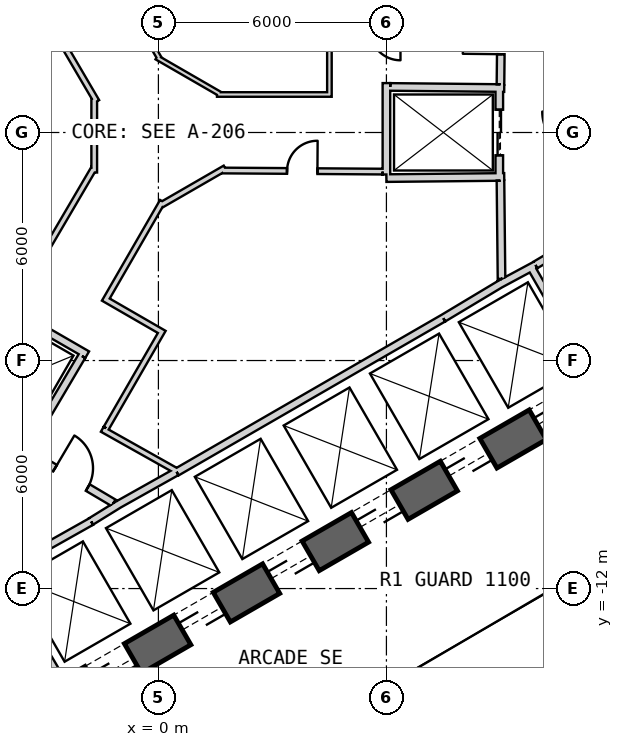
"""IFC4 building model, lengths in metres.
Left out: names, types, materials, properties, quantities, classifications, styles, units other than length and angle.
Written with IfcOpenShell. Run it as: python <this file> out.ifc"""

import sys

from ifc_helpers import new_model, si_unit, direction, frame, frame_2d, origin, place, context, subcontext, project, spatial, rectangle, extrude, element, fill, save


model = new_model("IFC4")
c1 = context("Model", 3, precision=1e-05, world=origin(), true_north=direction((0.0, 1.0)))
c2 = subcontext(c1, "Body", "Model", "MODEL_VIEW")
j1 = project(units=[si_unit("LENGTHUNIT", "METRE"), si_unit("PLANEANGLEUNIT", "RADIAN")], contexts=[c1])
p1 = place(None, origin())
s1 = spatial("IfcSite", under=j1, at=p1, CompositionType="ELEMENT")
p2 = place(p1, origin())
s2 = spatial("IfcBuilding", under=s1, at=p2, CompositionType="ELEMENT")
p3 = place(p2, frame((0.0, 0.0, 21.5)))
s3 = spatial("IfcBuildingStorey", under=s2, at=p3, CompositionType="ELEMENT", Elevation=21.5)
p4 = place(p3, frame((19.475, 2.208, 0.0), z_axis=(0.0, 0.0, 1.0), x_axis=(-0.866028369851, 0.499994862586, 0.0)))
e1 = element("IfcWall", 1, at=p4, inside=s3, PredefinedType="SHEAR", context=c2, shape_type="SweptSolid", body=[
    extrude(rectangle(XDim=31.523, YDim=0.9, at=frame_2d((15.762, 0.0))), origin(), (0.0, 0.0, 1.0), 6.0),
])
p5 = place(p4, frame((7.062, 0.0, 0.0)))
e2 = element("IfcOpeningElement", 2, at=p5, cuts=e1, PredefinedType="OPENING", context=c2, shape_type="SweptSolid", body=[
    extrude(rectangle(XDim=1.2, YDim=2.4, at=frame_2d((0.6, 1.2))), frame((0.0, 0.46, 0.0), z_axis=(0.0, -1.0, 0.0), x_axis=(1.0, 0.0, 0.0)), (0.0, 0.0, 1.0), 0.92),
])
p6 = place(p4, frame((9.762, 0.0, 0.0)))
e3 = element("IfcOpeningElement", 3, at=p6, cuts=e1, PredefinedType="OPENING", context=c2, shape_type="SweptSolid", body=[
    extrude(rectangle(XDim=1.2, YDim=2.4, at=frame_2d((0.6, 1.2))), frame((0.0, 0.46, 0.0), z_axis=(0.0, -1.0, 0.0), x_axis=(1.0, 0.0, 0.0)), (0.0, 0.0, 1.0), 0.92),
])
p7 = place(p4, frame((12.462, 0.0, 0.0)))
e4 = element("IfcOpeningElement", 4, at=p7, cuts=e1, PredefinedType="OPENING", context=c2, shape_type="SweptSolid", body=[
    extrude(rectangle(XDim=1.2, YDim=2.4, at=frame_2d((0.6, 1.2))), frame((0.0, 0.46, 0.0), z_axis=(0.0, -1.0, 0.0), x_axis=(1.0, 0.0, 0.0)), (0.0, 0.0, 1.0), 0.92),
])
p8 = place(p4, frame((15.162, 0.0, 0.0)))
e5 = element("IfcOpeningElement", 5, at=p8, cuts=e1, PredefinedType="OPENING", context=c2, shape_type="SweptSolid", body=[
    extrude(rectangle(XDim=1.2, YDim=2.4, at=frame_2d((0.6, 1.2))), frame((0.0, 0.46, 0.0), z_axis=(0.0, -1.0, 0.0), x_axis=(1.0, 0.0, 0.0)), (0.0, 0.0, 1.0), 0.92),
])
p9 = place(p4, frame((17.862, 0.0, 0.0)))
e6 = element("IfcOpeningElement", 6, at=p9, cuts=e1, PredefinedType="OPENING", context=c2, shape_type="SweptSolid", body=[
    extrude(rectangle(XDim=1.2, YDim=2.4, at=frame_2d((0.6, 1.2))), frame((0.0, 0.46, 0.0), z_axis=(0.0, -1.0, 0.0), x_axis=(1.0, 0.0, 0.0)), (0.0, 0.0, 1.0), 0.92),
])
p10 = place(p4, frame((20.562, 0.0, 0.0)))
e7 = element("IfcOpeningElement", 7, at=p10, cuts=e1, PredefinedType="OPENING", context=c2, shape_type="SweptSolid", body=[
    extrude(rectangle(XDim=1.2, YDim=2.4, at=frame_2d((0.6, 1.2))), frame((0.0, 0.46, 0.0), z_axis=(0.0, -1.0, 0.0), x_axis=(1.0, 0.0, 0.0)), (0.0, 0.0, 1.0), 0.92),
])
p11 = place(p4, frame((23.262, 0.0, 0.0)))
e8 = element("IfcOpeningElement", 8, at=p11, cuts=e1, PredefinedType="OPENING", context=c2, shape_type="SweptSolid", body=[
    extrude(rectangle(XDim=1.2, YDim=2.4, at=frame_2d((0.6, 1.2))), frame((0.0, 0.46, 0.0), z_axis=(0.0, -1.0, 0.0), x_axis=(1.0, 0.0, 0.0)), (0.0, 0.0, 1.0), 0.92),
])
p12 = place(p4, frame((3.612, 0.0, 0.0)))
e9 = element("IfcOpeningElement", 9, at=p12, cuts=e1, PredefinedType="OPENING", context=c2, shape_type="SweptSolid", body=[
    extrude(rectangle(XDim=1.2, YDim=2.4, at=frame_2d((0.6, 1.2))), frame((0.0, 0.46, 0.0), z_axis=(0.0, -1.0, 0.0), x_axis=(1.0, 0.0, 0.0)), (0.0, 0.0, 1.0), 0.92),
])
p13 = place(p4, frame((26.712, 0.0, 0.0)))
e10 = element("IfcOpeningElement", 10, at=p13, cuts=e1, PredefinedType="OPENING", context=c2, shape_type="SweptSolid", body=[
    extrude(rectangle(XDim=1.2, YDim=2.4, at=frame_2d((0.6, 1.2))), frame((0.0, 0.46, 0.0), z_axis=(0.0, -1.0, 0.0), x_axis=(1.0, 0.0, 0.0)), (0.0, 0.0, 1.0), 0.92),
])
p14 = place(p3, frame((-7.825, -17.97, 0.0), z_axis=(0.0, 0.0, 1.0), x_axis=(0.866028369851, 0.499994862586, 0.0)))
e11 = element("IfcWall", 11, at=p14, inside=s3, PredefinedType="SHEAR", context=c2, shape_type="SweptSolid", body=[
    extrude(rectangle(XDim=31.523, YDim=0.9, at=frame_2d((15.762, 0.0))), origin(), (0.0, 0.0, 1.0), 6.0),
])
p15 = place(p14, frame((7.062, 0.0, 0.0)))
e12 = element("IfcOpeningElement", 12, at=p15, cuts=e11, PredefinedType="OPENING", context=c2, shape_type="SweptSolid", body=[
    extrude(rectangle(XDim=1.2, YDim=2.4, at=frame_2d((0.6, 1.2))), frame((0.0, 0.46, 0.0), z_axis=(0.0, -1.0, 0.0), x_axis=(1.0, 0.0, 0.0)), (0.0, 0.0, 1.0), 0.92),
])
p16 = place(p14, frame((9.762, 0.0, 0.0)))
e13 = element("IfcOpeningElement", 13, at=p16, cuts=e11, PredefinedType="OPENING", context=c2, shape_type="SweptSolid", body=[
    extrude(rectangle(XDim=1.2, YDim=2.4, at=frame_2d((0.6, 1.2))), frame((0.0, 0.46, 0.0), z_axis=(0.0, -1.0, 0.0), x_axis=(1.0, 0.0, 0.0)), (0.0, 0.0, 1.0), 0.92),
])
p17 = place(p14, frame((12.462, 0.0, 0.0)))
e14 = element("IfcOpeningElement", 14, at=p17, cuts=e11, PredefinedType="OPENING", context=c2, shape_type="SweptSolid", body=[
    extrude(rectangle(XDim=1.2, YDim=2.4, at=frame_2d((0.6, 1.2))), frame((0.0, 0.46, 0.0), z_axis=(0.0, -1.0, 0.0), x_axis=(1.0, 0.0, 0.0)), (0.0, 0.0, 1.0), 0.92),
])
p18 = place(p14, frame((15.162, 0.0, 0.0)))
e15 = element("IfcOpeningElement", 15, at=p18, cuts=e11, PredefinedType="OPENING", context=c2, shape_type="SweptSolid", body=[
    extrude(rectangle(XDim=1.2, YDim=2.4, at=frame_2d((0.6, 1.2))), frame((0.0, 0.46, 0.0), z_axis=(0.0, -1.0, 0.0), x_axis=(1.0, 0.0, 0.0)), (0.0, 0.0, 1.0), 0.92),
])
p19 = place(p14, frame((17.862, 0.0, 0.0)))
e16 = element("IfcOpeningElement", 16, at=p19, cuts=e11, PredefinedType="OPENING", context=c2, shape_type="SweptSolid", body=[
    extrude(rectangle(XDim=1.2, YDim=2.4, at=frame_2d((0.6, 1.2))), frame((0.0, 0.46, 0.0), z_axis=(0.0, -1.0, 0.0), x_axis=(1.0, 0.0, 0.0)), (0.0, 0.0, 1.0), 0.92),
])
p20 = place(p14, frame((20.562, 0.0, 0.0)))
e17 = element("IfcOpeningElement", 17, at=p20, cuts=e11, PredefinedType="OPENING", context=c2, shape_type="SweptSolid", body=[
    extrude(rectangle(XDim=1.2, YDim=2.4, at=frame_2d((0.6, 1.2))), frame((0.0, 0.46, 0.0), z_axis=(0.0, -1.0, 0.0), x_axis=(1.0, 0.0, 0.0)), (0.0, 0.0, 1.0), 0.92),
])
p21 = place(p14, frame((26.712, 0.0, 0.0)))
e18 = element("IfcOpeningElement", 18, at=p21, cuts=e11, PredefinedType="OPENING", context=c2, shape_type="SweptSolid", body=[
    extrude(rectangle(XDim=1.2, YDim=2.4, at=frame_2d((0.6, 1.2))), frame((0.0, 0.46, 0.0), z_axis=(0.0, -1.0, 0.0), x_axis=(1.0, 0.0, 0.0)), (0.0, 0.0, 1.0), 0.92),
])
p22 = place(p14, frame((3.612, 0.0, 0.0)))
e19 = element("IfcOpeningElement", 19, at=p22, cuts=e11, PredefinedType="OPENING", context=c2, shape_type="SweptSolid", body=[
    extrude(rectangle(XDim=1.2, YDim=2.4, at=frame_2d((0.6, 1.2))), frame((0.0, 0.46, 0.0), z_axis=(0.0, -1.0, 0.0), x_axis=(1.0, 0.0, 0.0)), (0.0, 0.0, 1.0), 0.92),
])
p23 = place(p3, frame((0.483, -8.936, 0.0), z_axis=(0.0, 0.0, 1.0), x_axis=(0.866030989016, 0.499990325971, 0.0)))
e20 = element("IfcWall", 20, at=p23, inside=s3, PredefinedType="PLUMBINGWALL", context=c2, shape_type="SweptSolid", body=[
    extrude(rectangle(XDim=8.1, YDim=0.2, at=frame_2d((4.05, 0.0))), origin(), (0.0, 0.0, 1.0), 5.7),
])
p24 = place(p3, frame((9.795, -3.525, 0.0), z_axis=(0.0, 0.0, 1.0), x_axis=(0.499984717929, -0.866034226713, 0.0)))
e21 = element("IfcWall", 21, at=p24, inside=s3, PredefinedType="PLUMBINGWALL", context=c2, shape_type="SweptSolid", body=[
    extrude(rectangle(XDim=3.25, YDim=0.2, at=frame_2d((1.625, 0.0))), origin(), (0.0, 0.0, 1.0), 5.7),
])
p25 = place(p3, frame((8.974, -3.999, 0.0), z_axis=(0.0, 0.0, 1.0), x_axis=(0.880907015104, 0.473289373154, 0.0)))
e22 = element("IfcWall", 22, at=p25, inside=s3, PredefinedType="PLUMBINGWALL", context=c2, shape_type="SweptSolid", body=[
    extrude(rectangle(XDim=1.078, YDim=0.2, at=frame_2d((0.539, 0.0))), origin(), (0.0, 0.0, 1.0), 5.7),
])
p26 = place(p3, frame((7.497, -4.886, 0.0), z_axis=(0.0, 0.0, 1.0), x_axis=(0.857516281273, 0.51445682749, 0.0)))
e23 = element("IfcWall", 23, at=p26, inside=s3, PredefinedType="PLUMBINGWALL", context=c2, shape_type="SweptSolid", body=[
    extrude(rectangle(XDim=1.845, YDim=0.2, at=frame_2d((0.922, 0.0))), origin(), (0.0, 0.0, 1.0), 5.7),
])
p27 = place(p3, frame((-2.558, -14.409, 0.0), z_axis=(0.0, 0.0, 1.0), x_axis=(-0.507997497166, 0.861358544901, 0.0)))
e24 = element("IfcWall", 24, at=p27, inside=s3, PredefinedType="PLUMBINGWALL", context=c2, shape_type="SweptSolid", body=[
    extrude(rectangle(XDim=3.35, YDim=0.2, at=frame_2d((1.675, 0.0))), origin(), (0.0, 0.0, 1.0), 5.7),
])
p28 = place(p3, frame((-1.769, -10.237, 0.0), z_axis=(0.0, 0.0, 1.0), x_axis=(-0.871534483978, -0.490334215854, 0.0)))
e25 = element("IfcWall", 25, at=p28, inside=s3, PredefinedType="PLUMBINGWALL", context=c2, shape_type="SweptSolid", body=[
    extrude(rectangle(XDim=2.7, YDim=0.2, at=frame_2d((1.35, 0.0))), origin(), (0.0, 0.0, 1.0), 5.7),
])
p29 = place(p3, frame((-1.024, -9.771, 0.0), z_axis=(0.0, 0.0, 1.0), x_axis=(-0.850348075135, -0.526220629693, 0.0)))
e26 = element("IfcWall", 26, at=p29, inside=s3, PredefinedType="PLUMBINGWALL", context=c2, shape_type="SweptSolid", body=[
    extrude(rectangle(XDim=0.878, YDim=0.2, at=frame_2d((0.439, 0.0))), origin(), (0.0, 0.0, 1.0), 5.7),
])
p30 = place(p3, frame((-1.13, -9.832, 0.0), z_axis=(0.0, 0.0, 1.0), x_axis=(0.871988740738, 0.489525929882, 0.0)))
e27 = element("IfcWall", 27, at=p30, inside=s3, PredefinedType="PLUMBINGWALL", context=c2, shape_type="SweptSolid", body=[
    extrude(rectangle(XDim=1.845, YDim=0.2, at=frame_2d((0.922, 0.0))), origin(), (0.0, 0.0, 1.0), 5.7),
])
p31 = place(p3, frame((8.97, 1.2, 0.0), z_axis=(0.0, 0.0, 1.0), x_axis=(0.0, -1.0, 0.0)))
e28 = element("IfcWall", 28, at=p31, inside=s3, PredefinedType="PLUMBINGWALL", context=c2, shape_type="SweptSolid", body=[
    extrude(rectangle(XDim=2.4, YDim=0.2, at=frame_2d((1.2, 0.0))), origin(), (0.0, 0.0, 1.0), 5.7),
])
p32 = place(p31, frame((0.6, 0.0, 0.0)))
e29 = element("IfcOpeningElement", 29, at=p32, cuts=e28, PredefinedType="OPENING", context=c2, shape_type="SweptSolid", body=[
    extrude(rectangle(XDim=1.2, YDim=2.4, at=frame_2d((0.6, 1.2))), frame((0.0, 0.11, 0.0), z_axis=(0.0, -1.0, 0.0), x_axis=(1.0, 0.0, 0.0)), (0.0, 0.0, 1.0), 0.22),
])
p33 = place(p3, frame((9.1, -1.169, 0.0), z_axis=(0.0, 0.0, 1.0), x_axis=(-0.999949988, -0.010001074852, 0.0)))
e30 = element("IfcWall", 30, at=p33, inside=s3, PredefinedType="PLUMBINGWALL", context=c2, shape_type="SweptSolid", body=[
    extrude(rectangle(XDim=3.1, YDim=0.2, at=frame_2d((1.55, 0.0))), origin(), (0.0, 0.0, 1.0), 5.7),
])
p34 = place(p3, frame((6.0, -1.104, 0.0), z_axis=(0.0, 0.0, 1.0), x_axis=(0.0, 1.0, 0.0)))
e31 = element("IfcWall", 31, at=p34, inside=s3, PredefinedType="PLUMBINGWALL", context=c2, shape_type="SweptSolid", body=[
    extrude(rectangle(XDim=2.405, YDim=0.2, at=frame_2d((1.202, 0.0))), origin(), (0.0, 0.0, 1.0), 5.7),
])
p35 = place(p3, frame((9.1, 1.169, 0.0), z_axis=(0.0, 0.0, 1.0), x_axis=(-0.99994990606, 0.010009264196, 0.0)))
e32 = element("IfcWall", 32, at=p35, inside=s3, PredefinedType="PLUMBINGWALL", context=c2, shape_type="SweptSolid", body=[
    extrude(rectangle(XDim=3.0, YDim=0.2, at=frame_2d((1.5, 0.0))), origin(), (0.0, 0.0, 1.0), 5.7),
])
p36 = place(p3, frame((-3.957, -4.644, 0.0), z_axis=(0.0, 0.0, 1.0), x_axis=(0.865991127953, -0.500059362782, 0.0)))
e33 = element("IfcWall", 33, at=p36, inside=s3, PredefinedType="PLUMBINGWALL", context=c2, shape_type="SweptSolid", body=[
    extrude(rectangle(XDim=2.405, YDim=0.2, at=frame_2d((1.202, 0.0))), origin(), (0.0, 0.0, 1.0), 5.7),
])
p37 = place(p3, frame((-2.012, -5.882, 0.0), z_axis=(0.0, 0.0, 1.0), x_axis=(-0.508619639323, -0.860991325447, 0.0)))
e34 = element("IfcWall", 34, at=p37, inside=s3, PredefinedType="PLUMBINGWALL", context=c2, shape_type="SweptSolid", body=[
    extrude(rectangle(XDim=3.0, YDim=0.2, at=frame_2d((1.5, 0.0))), origin(), (0.0, 0.0, 1.0), 5.7),
])
p38 = place(p3, frame((12.245, -2.109, 0.0), z_axis=(0.0, 0.0, 1.0), x_axis=(-0.860414880418, -0.509594185166, 0.0)))
e35 = element("IfcWall", 35, at=p38, inside=s3, PredefinedType="PARTITIONING", context=c2, shape_type="SweptSolid", body=[
    extrude(rectangle(XDim=2.7, YDim=0.2, at=frame_2d((1.35, 0.0))), origin(), (0.0, 0.0, 1.0), 5.7),
])
p39 = place(p3, frame((9.029, -3.851, 0.0), z_axis=(0.0, 0.0, 1.0), x_axis=(-0.010784614026, 0.999941844359, 0.0)))
e36 = element("IfcWall", 36, at=p39, inside=s3, PredefinedType="PARTITIONING", context=c2, shape_type="SweptSolid", body=[
    extrude(rectangle(XDim=2.581, YDim=0.2, at=frame_2d((1.291, 0.0))), origin(), (0.0, 0.0, 1.0), 5.7),
])
p40 = place(p3, frame((9.001, 1.27, 0.0), z_axis=(0.0, 0.0, 1.0), x_axis=(0.010783593937, 0.99994185536, 0.0)))
e37 = element("IfcWall", 37, at=p40, inside=s3, PredefinedType="PARTITIONING", context=c2, shape_type="SweptSolid", body=[
    extrude(rectangle(XDim=2.581, YDim=0.2, at=frame_2d((1.291, 0.0))), origin(), (0.0, 0.0, 1.0), 5.7),
])
p41 = place(p40, frame((0.791, 0.0, 0.0)))
e38 = element("IfcOpeningElement", 38, at=p41, cuts=e37, PredefinedType="OPENING", context=c2, shape_type="SweptSolid", body=[
    extrude(rectangle(XDim=1.0, YDim=2.1, at=frame_2d((0.5, 1.05))), frame((0.0, 0.11, 0.0), z_axis=(0.0, -1.0, 0.0), x_axis=(1.0, 0.0, 0.0)), (0.0, 0.0, 1.0), 0.22),
])
p42 = place(p3, frame((-3.401, -8.43, 0.0), z_axis=(0.0, 0.0, 1.0), x_axis=(0.860598681535, -0.509283721849, 0.0)))
e39 = element("IfcWall", 39, at=p42, inside=s3, PredefinedType="PARTITIONING", context=c2, shape_type="SweptSolid", body=[
    extrude(rectangle(XDim=2.581, YDim=0.2, at=frame_2d((1.291, 0.0))), origin(), (0.0, 0.0, 1.0), 5.7),
])
p43 = place(p42, frame((0.791, 0.0, 0.0)))
e40 = element("IfcOpeningElement", 40, at=p43, cuts=e39, PredefinedType="OPENING", context=c2, shape_type="SweptSolid", body=[
    extrude(rectangle(XDim=1.0, YDim=2.1, at=frame_2d((0.5, 1.05))), frame((0.0, 0.11, 0.0), z_axis=(0.0, -1.0, 0.0), x_axis=(1.0, 0.0, 0.0)), (0.0, 0.0, 1.0), 0.22),
])
p44 = place(p3, frame((-1.624, 0.815, 0.0), z_axis=(0.0, 0.0, 1.0), x_axis=(-0.505868173579, 0.862610799237, 0.0)))
e41 = element("IfcWall", 41, at=p44, inside=s3, PredefinedType="PLUMBINGWALL", context=c2, shape_type="SweptSolid", body=[
    extrude(rectangle(XDim=4.383, YDim=0.15, at=frame_2d((2.191, 0.0))), origin(), (0.0, 0.0, 1.0), 5.7),
])
p45 = place(p44, frame((1.855, 0.0, 0.0)))
e42 = element("IfcOpeningElement", 42, at=p45, cuts=e41, PredefinedType="OPENING", context=c2, shape_type="SweptSolid", body=[
    extrude(rectangle(XDim=0.8, YDim=2.1, at=frame_2d((0.4, 1.05))), frame((0.0, 0.085, 0.0), z_axis=(0.0, -1.0, 0.0), x_axis=(1.0, 0.0, 0.0)), (0.0, 0.0, 1.0), 0.17),
])
p46 = place(p3, frame((-1.689, -1.053, 0.0), z_axis=(0.0, 0.0, 1.0), x_axis=(0.0, 1.0, 0.0)))
e43 = element("IfcWall", 43, at=p46, inside=s3, PredefinedType="PLUMBINGWALL", context=c2, shape_type="SweptSolid", body=[
    extrude(rectangle(XDim=1.954, YDim=0.15, at=frame_2d((0.977, 0.0))), origin(), (0.0, 0.0, 1.0), 5.7),
])
p47 = place(p3, frame((-3.841, -4.595, 0.0), z_axis=(0.0, 0.0, 1.0), x_axis=(0.505857207696, 0.862617229959, 0.0)))
e44 = element("IfcWall", 44, at=p47, inside=s3, PredefinedType="PLUMBINGWALL", context=c2, shape_type="SweptSolid", body=[
    extrude(rectangle(XDim=4.231, YDim=0.15, at=frame_2d((2.116, 0.0))), origin(), (0.0, 0.0, 1.0), 5.7),
])
p48 = place(p3, frame((-1.477, -7.808, 0.0), z_axis=(0.0, 0.0, 1.0), x_axis=(0.871822901869, -0.48982122022, 0.0)))
e45 = element("IfcWall", 45, at=p48, inside=s3, PredefinedType="PLUMBINGWALL", context=c2, shape_type="SweptSolid", body=[
    extrude(rectangle(XDim=2.24, YDim=0.15, at=frame_2d((1.12, 0.0))), origin(), (0.0, 0.0, 1.0), 5.7),
])
p49 = place(p3, frame((0.126, -5.182, 0.0), z_axis=(0.0, 0.0, 1.0), x_axis=(-0.499990139034, -0.866031096941, 0.0)))
e46 = element("IfcWall", 46, at=p49, inside=s3, PredefinedType="PLUMBINGWALL", context=c2, shape_type="SweptSolid", body=[
    extrude(rectangle(XDim=3.0, YDim=0.15, at=frame_2d((1.5, 0.0))), origin(), (0.0, 0.0, 1.0), 5.7),
])
p50 = place(p3, frame((-1.449, -4.36, 0.0), z_axis=(0.0, 0.0, 1.0), x_axis=(0.866025371046, -0.500000056704, 0.0)))
e47 = element("IfcWall", 47, at=p50, inside=s3, PredefinedType="PLUMBINGWALL", context=c2, shape_type="SweptSolid", body=[
    extrude(rectangle(XDim=1.7, YDim=0.15, at=frame_2d((0.85, 0.0))), origin(), (0.0, 0.0, 1.0), 5.7),
])
p51 = place(p3, frame((0.108, -1.812, 0.0), z_axis=(0.0, 0.0, 1.0), x_axis=(-0.49994762993, -0.866055637547, 0.0)))
e48 = element("IfcWall", 48, at=p51, inside=s3, PredefinedType="PLUMBINGWALL", context=c2, shape_type="SweptSolid", body=[
    extrude(rectangle(XDim=2.909, YDim=0.15, at=frame_2d((1.455, 0.0))), origin(), (0.0, 0.0, 1.0), 5.7),
])
p52 = place(p3, frame((1.756, -0.936, 0.0), z_axis=(0.0, 0.0, 1.0), x_axis=(-0.86601293162, -0.5000216018, 0.0)))
e49 = element("IfcWall", 49, at=p52, inside=s3, PredefinedType="PLUMBINGWALL", context=c2, shape_type="SweptSolid", body=[
    extrude(rectangle(XDim=1.955, YDim=0.15, at=frame_2d((0.977, 0.0))), origin(), (0.0, 0.0, 1.0), 5.7),
])
p53 = place(p3, frame((5.9, -1.029, 0.0), z_axis=(0.0, 0.0, 1.0), x_axis=(-0.999977210765, 0.00675114447, 0.0)))
e50 = element("IfcWall", 50, at=p53, inside=s3, PredefinedType="PLUMBINGWALL", context=c2, shape_type="SweptSolid", body=[
    extrude(rectangle(XDim=4.231, YDim=0.15, at=frame_2d((2.115, 0.0))), origin(), (0.0, 0.0, 1.0), 5.7),
])
p54 = place(p53, frame((1.716, 0.0, 0.0)))
e51 = element("IfcOpeningElement", 51, at=p54, cuts=e50, PredefinedType="OPENING", context=c2, shape_type="SweptSolid", body=[
    extrude(rectangle(XDim=0.8, YDim=2.1, at=frame_2d((0.4, 1.05))), frame((0.0, 0.085, 0.0), z_axis=(0.0, -1.0, 0.0), x_axis=(1.0, 0.0, 0.0)), (0.0, 0.0, 1.0), 0.17),
])
p55 = place(p3, frame((4.5, 0.94, 0.0), z_axis=(0.0, 0.0, 1.0), x_axis=(0.0, 1.0, 0.0)))
e52 = element("IfcWall", 52, at=p55, inside=s3, PredefinedType="PARTITIONING", context=c2, shape_type="SweptSolid", body=[
    extrude(rectangle(XDim=1.7, YDim=0.12, at=frame_2d((0.85, 0.0))), origin(), (0.0, 0.0, 1.0), 5.7),
])
p56 = place(p3, frame((1.542, 1.0, 0.0), z_axis=(0.0, 0.0, 1.0), x_axis=(1.0, 0.0, 0.0)))
e53 = element("IfcWall", 53, at=p56, inside=s3, PredefinedType="PARTITIONING", context=c2, shape_type="SweptSolid", body=[
    extrude(rectangle(XDim=2.898, YDim=0.12, at=frame_2d((1.449, 0.0))), origin(), (0.0, 0.0, 1.0), 5.7),
])
p57 = place(p3, frame((-0.047, 1.977, 0.0), z_axis=(0.0, 0.0, 1.0), x_axis=(0.865998615205, -0.500046396311, 0.0)))
e54 = element("IfcWall", 54, at=p57, inside=s3, PredefinedType="PARTITIONING", context=c2, shape_type="SweptSolid", body=[
    extrude(rectangle(XDim=1.935, YDim=0.12, at=frame_2d((0.968, 0.0))), origin(), (0.0, 0.0, 1.0), 5.7),
])
p58 = place(p3, frame((-1.414, 4.449, 0.0), z_axis=(0.0, 0.0, 1.0), x_axis=(0.500028961621, -0.866008682139, 0.0)))
e55 = element("IfcWall", 55, at=p58, inside=s3, PredefinedType="PARTITIONING", context=c2, shape_type="SweptSolid", body=[
    extrude(rectangle(XDim=2.896, YDim=0.12, at=frame_2d((1.448, 0.0))), origin(), (0.0, 0.0, 1.0), 5.7),
])
p59 = place(p41, origin())
e56 = element("IfcDoor", 56, at=p59, inside=s3, OperationType="SINGLE_SWING_LEFT", PredefinedType="USERDEFINED", context=c2, shape_type="SweptSolid", body=[
    extrude(rectangle(XDim=1.0, YDim=2.1, at=frame_2d((0.5, 1.05))), frame((0.0, 0.025, 0.0), z_axis=(0.0, -1.0, 0.0), x_axis=(1.0, 0.0, 0.0)), (0.0, 0.0, 1.0), 0.05),
])
fill(e38, e56)
p60 = place(p32, origin())
e57 = element("IfcDoor", 57, at=p60, inside=s3, OperationType="SLIDING_TO_LEFT", PredefinedType="USERDEFINED", context=c2, shape_type="SweptSolid", body=[
    extrude(rectangle(XDim=1.2, YDim=2.4, at=frame_2d((0.6, 1.2))), frame((0.0, 0.025, 0.0), z_axis=(0.0, -1.0, 0.0), x_axis=(1.0, 0.0, 0.0)), (0.0, 0.0, 1.0), 0.05),
])
fill(e29, e57)
p61 = place(p43, origin())
e58 = element("IfcDoor", 58, at=p61, inside=s3, OperationType="SINGLE_SWING_LEFT", PredefinedType="USERDEFINED", context=c2, shape_type="SweptSolid", body=[
    extrude(rectangle(XDim=1.0, YDim=2.1, at=frame_2d((0.5, 1.05))), frame((0.0, 0.025, 0.0), z_axis=(0.0, -1.0, 0.0), x_axis=(1.0, 0.0, 0.0)), (0.0, 0.0, 1.0), 0.05),
])
fill(e40, e58)
p62 = place(p54, origin())
e59 = element("IfcDoor", 59, at=p62, inside=s3, OperationType="SINGLE_SWING_LEFT", PredefinedType="USERDEFINED", context=c2, shape_type="SweptSolid", body=[
    extrude(rectangle(XDim=0.8, YDim=2.1, at=frame_2d((0.4, 1.05))), frame((0.0, 0.025, 0.0), z_axis=(0.0, -1.0, 0.0), x_axis=(1.0, 0.0, 0.0)), (0.0, 0.0, 1.0), 0.05),
])
fill(e51, e59)
p63 = place(p15, origin())
e60 = element("IfcDoor", 60, at=p63, inside=s3, OperationType="SLIDING_TO_LEFT", PredefinedType="USERDEFINED", context=c2, shape_type="SweptSolid", body=[
    extrude(rectangle(XDim=1.2, YDim=2.4, at=frame_2d((0.6, 1.2))), frame((0.0, 0.025, 0.0), z_axis=(0.0, -1.0, 0.0), x_axis=(1.0, 0.0, 0.0)), (0.0, 0.0, 1.0), 0.05),
])
fill(e12, e60)
p64 = place(p16, origin())
e61 = element("IfcDoor", 61, at=p64, inside=s3, OperationType="SLIDING_TO_LEFT", PredefinedType="USERDEFINED", context=c2, shape_type="SweptSolid", body=[
    extrude(rectangle(XDim=1.2, YDim=2.4, at=frame_2d((0.6, 1.2))), frame((0.0, 0.025, 0.0), z_axis=(0.0, -1.0, 0.0), x_axis=(1.0, 0.0, 0.0)), (0.0, 0.0, 1.0), 0.05),
])
fill(e13, e61)
p65 = place(p17, origin())
e62 = element("IfcDoor", 62, at=p65, inside=s3, OperationType="SLIDING_TO_LEFT", PredefinedType="USERDEFINED", context=c2, shape_type="SweptSolid", body=[
    extrude(rectangle(XDim=1.2, YDim=2.4, at=frame_2d((0.6, 1.2))), frame((0.0, 0.025, 0.0), z_axis=(0.0, -1.0, 0.0), x_axis=(1.0, 0.0, 0.0)), (0.0, 0.0, 1.0), 0.05),
])
fill(e14, e62)
p66 = place(p18, origin())
e63 = element("IfcDoor", 63, at=p66, inside=s3, OperationType="SLIDING_TO_LEFT", PredefinedType="USERDEFINED", context=c2, shape_type="SweptSolid", body=[
    extrude(rectangle(XDim=1.2, YDim=2.4, at=frame_2d((0.6, 1.2))), frame((0.0, 0.025, 0.0), z_axis=(0.0, -1.0, 0.0), x_axis=(1.0, 0.0, 0.0)), (0.0, 0.0, 1.0), 0.05),
])
fill(e15, e63)
p67 = place(p19, origin())
e64 = element("IfcDoor", 64, at=p67, inside=s3, OperationType="SLIDING_TO_LEFT", PredefinedType="USERDEFINED", context=c2, shape_type="SweptSolid", body=[
    extrude(rectangle(XDim=1.2, YDim=2.4, at=frame_2d((0.6, 1.2))), frame((0.0, 0.025, 0.0), z_axis=(0.0, -1.0, 0.0), x_axis=(1.0, 0.0, 0.0)), (0.0, 0.0, 1.0), 0.05),
])
fill(e16, e64)
p68 = place(p20, origin())
e65 = element("IfcDoor", 65, at=p68, inside=s3, OperationType="SLIDING_TO_LEFT", PredefinedType="USERDEFINED", context=c2, shape_type="SweptSolid", body=[
    extrude(rectangle(XDim=1.2, YDim=2.4, at=frame_2d((0.6, 1.2))), frame((0.0, 0.025, 0.0), z_axis=(0.0, -1.0, 0.0), x_axis=(1.0, 0.0, 0.0)), (0.0, 0.0, 1.0), 0.05),
])
fill(e17, e65)
save(model, sys.argv[1])
